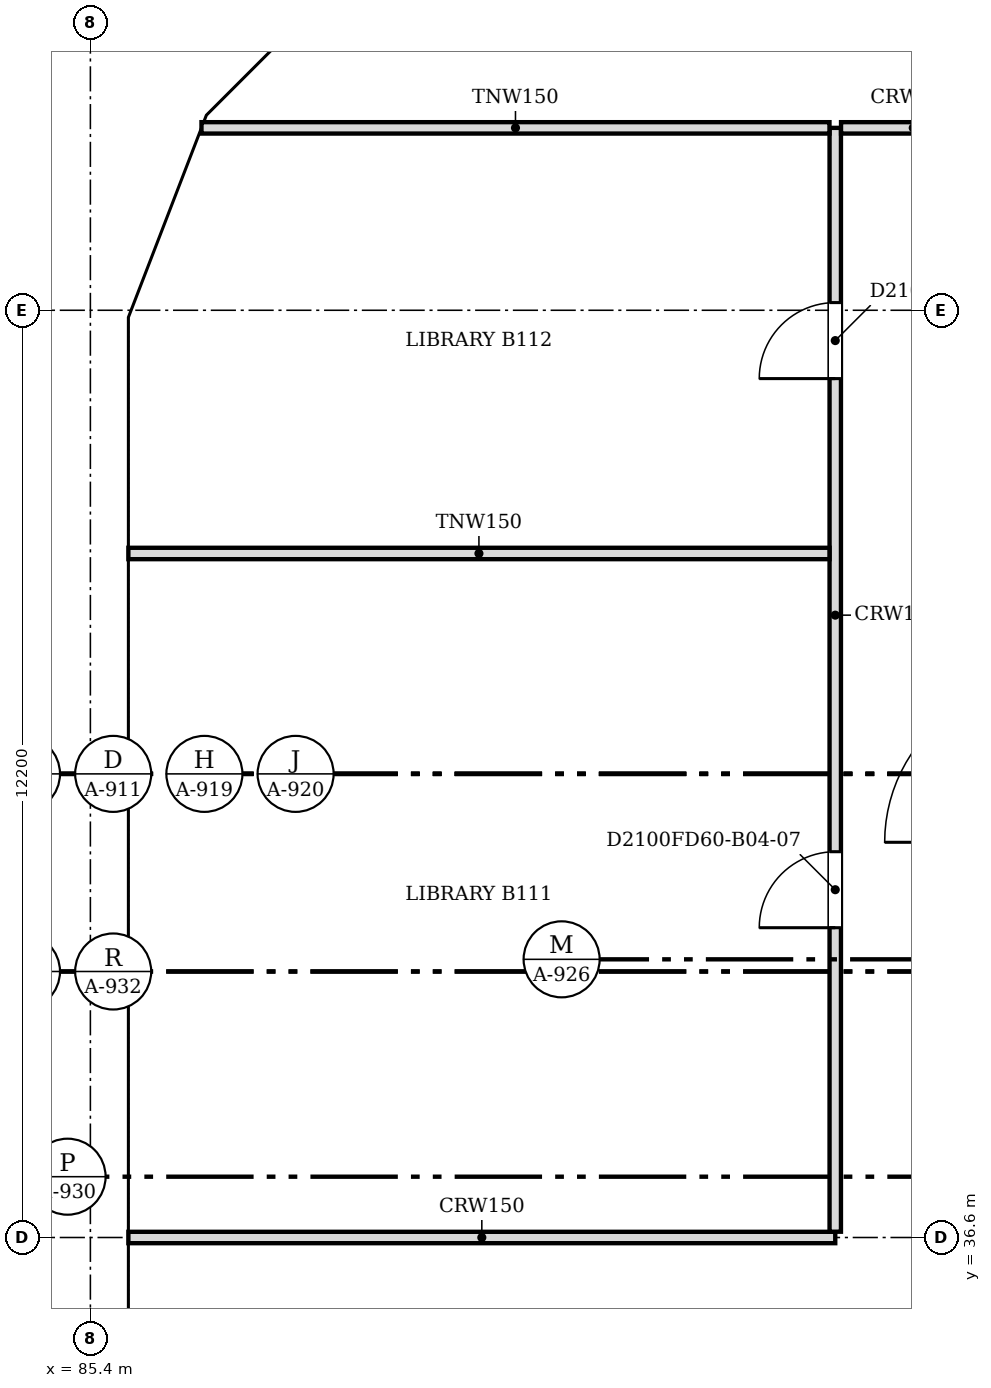
"""IFC4 building model, lengths in metres.
Left out: names, types, materials, properties, quantities, classifications, styles, units other than length and angle.
Written with IfcOpenShell. Run it as: python <this file> out.ifc"""

import sys

from ifc_helpers import new_model, si_unit, direction, frame, frame_2d, origin, place, context, subcontext, project, spatial, polyline, rectangle, outline, extrude, faceted_brep, source, transform, mapped, element, fill, save


model = new_model("IFC4")
c1 = context("Model", 3, precision=1e-05, world=origin(), true_north=direction((0.0, 1.0)))
c2 = subcontext(c1, "Body", "Model", "MODEL_VIEW")
j1 = project(units=[si_unit("LENGTHUNIT", "METRE"), si_unit("PLANEANGLEUNIT", "RADIAN")], contexts=[c1])
p1 = place(None, origin())
s1 = spatial("IfcSite", under=j1, at=p1, CompositionType="ELEMENT")
p2 = place(p1, origin())
s2 = spatial("IfcBuilding", under=s1, at=p2, CompositionType="ELEMENT")
p3 = place(p2, frame((0.0, 0.0, 37.2)))
s3 = spatial("IfcBuildingStorey", under=s2, at=p3, CompositionType="ELEMENT", Elevation=37.2)
m1 = source(origin(), c2, "Body", "Brep", [
    faceted_brep([(0.053, -0.25, 0.0), (2.997, -0.25, 3.8), (0.053, -0.25, 7.6), (0.0, -0.25, 7.532), (0.0, -0.25, 0.068), (0.106, 0.25, 7.532), (2.944, 0.25, 3.868), (2.944, 0.25, 3.732), (0.106, 0.25, 0.068), (2.997, 0.0, 3.8), (0.053, 0.0, 0.0), (0.053, 0.0, 7.6)], [[[0, 1, 2, 3, 4]], [[5, 6, 7, 8]], [[8, 7, 9, 1, 0, 10]], [[6, 5, 11, 2, 1, 9]], [[3, 2, 11]], [[10, 0, 4]], [[8, 10, 4, 3, 11, 5]], [[9, 7, 6]]]),
])
p4 = place(p3, frame((88.831, 53.625, -3.8), z_axis=(0.0, 0.0, 1.0), x_axis=(-0.707147509625, -0.707066050402, 0.0)))
e1 = element("IfcWall", 1, at=p4, inside=s3, PredefinedType="SOLIDWALL", context=c2, shape_type="MappedRepresentation", body=[
    mapped(m1, transform((0.0, 0.0, 0.0), scale=1.0)),
])
m2 = source(origin(), c2, "Body", "SweptSolid", [
    extrude(outline(polyline([(0.253, 0.667), (2.681, 3.8), (0.253, 6.934), (0.253, 0.667)])), frame((0.0, 0.26, 0.0), z_axis=(0.0, -1.0, 0.0), x_axis=(1.0, 0.0, 0.0)), (0.0, 0.0, 1.0), 0.52),
])
p5 = place(p4, origin())
e2 = element("IfcOpeningElement", 2, at=p5, cuts=e1, PredefinedType="OPENING", context=c2, shape_type="MappedRepresentation", body=[
    mapped(m2, transform((0.0, 0.0, 0.0), scale=1.0)),
])
m3 = source(origin(), c2, "Body", "Brep", [
    faceted_brep([(2.95, -0.25, 0.0), (2.997, -0.25, 0.059), (2.997, -0.25, 7.541), (2.95, -0.25, 7.6), (0.0, -0.25, 3.8), (0.053, 0.25, 3.868), (2.904, 0.25, 7.54), (2.904, 0.25, 0.06), (0.053, 0.25, 3.732), (2.95, 0.0, 0.0), (2.95, 0.0, 7.6), (0.0, 0.0, 3.8)], [[[0, 1, 2, 3, 4]], [[5, 6, 7, 8]], [[1, 0, 9]], [[10, 3, 2]], [[6, 5, 11, 4, 3, 10]], [[8, 7, 9, 0, 4, 11]], [[8, 11, 5]], [[1, 9, 7, 6, 10, 2]]]),
])
p6 = place(p3, frame((86.712, 51.506, -3.8), z_axis=(0.0, 0.0, 1.0), x_axis=(-0.359874094142, -0.933000876937, 0.0)))
e3 = element("IfcWall", 3, at=p6, inside=s3, PredefinedType="SOLIDWALL", context=c2, shape_type="MappedRepresentation", body=[
    mapped(m3, transform((0.0, 0.0, 0.0), scale=1.0)),
])
m4 = source(origin(), c2, "Body", "SweptSolid", [
    extrude(outline(polyline([(2.75, 6.935), (0.316, 3.8), (2.75, 0.665), (2.75, 6.935)])), frame((0.0, 0.26, 0.0), z_axis=(0.0, -1.0, 0.0), x_axis=(1.0, 0.0, 0.0)), (0.0, 0.0, 1.0), 0.52),
])
p7 = place(p6, origin())
e4 = element("IfcOpeningElement", 4, at=p7, cuts=e3, PredefinedType="OPENING", context=c2, shape_type="MappedRepresentation", body=[
    mapped(m4, transform((0.0, 0.0, 0.0), scale=1.0)),
])
m5 = source(origin(), c2, "Body", "Brep", [
    faceted_brep([(0.047, -0.25, 0.0), (3.05, -0.25, 3.8), (0.047, -0.25, 7.6), (0.0, -0.25, 7.54), (0.0, -0.25, 0.06), (0.093, 0.25, 7.541), (3.05, 0.25, 3.8), (0.093, 0.25, 0.059), (0.047, 0.0, 0.0), (0.047, 0.0, 7.6)], [[[0, 1, 2, 3, 4]], [[5, 6, 7]], [[7, 6, 1, 0, 8]], [[6, 5, 9, 2, 1]], [[3, 2, 9]], [[8, 0, 4]], [[7, 8, 4, 3, 9, 5]]]),
])
p8 = place(p3, frame((85.65, 48.8, -3.8), z_axis=(0.0, 0.0, 1.0), x_axis=(0.0, -1.0, 0.0)))
e5 = element("IfcWall", 5, at=p8, inside=s3, PredefinedType="SOLIDWALL", context=c2, shape_type="MappedRepresentation", body=[
    mapped(m5, transform((0.0, 0.0, 0.0), scale=1.0)),
])
m6 = source(origin(), c2, "Body", "SweptSolid", [
    extrude(outline(polyline([(0.247, 0.656), (2.731, 3.8), (0.247, 6.944), (0.247, 0.656)])), frame((0.0, 0.26, 0.0), z_axis=(0.0, -1.0, 0.0), x_axis=(1.0, 0.0, 0.0)), (0.0, 0.0, 1.0), 0.52),
])
p9 = place(p8, origin())
e6 = element("IfcOpeningElement", 6, at=p9, cuts=e5, PredefinedType="OPENING", context=c2, shape_type="MappedRepresentation", body=[
    mapped(m6, transform((0.0, 0.0, 0.0), scale=1.0)),
])
m7 = source(origin(), c2, "Body", "SweptSolid", [
    extrude(outline(polyline([(3.05, 0.0), (6.1, 3.8), (3.05, 7.6), (0.0, 3.8), (3.05, 0.0)])), frame((0.0, 0.25, 0.0), z_axis=(0.0, -1.0, 0.0), x_axis=(1.0, 0.0, 0.0)), (0.0, 0.0, 1.0), 0.5),
])
p10 = place(p3, frame((85.65, 45.75, -3.8), z_axis=(0.0, 0.0, 1.0), x_axis=(0.0, -1.0, 0.0)))
e7 = element("IfcWall", 7, at=p10, inside=s3, PredefinedType="SOLIDWALL", context=c2, shape_type="MappedRepresentation", body=[
    mapped(m7, transform((0.0, 0.0, 0.0), scale=1.0)),
])
m8 = source(origin(), c2, "Body", "SweptSolid", [
    extrude(outline(polyline([(3.05, 0.399), (5.78, 3.8), (3.05, 7.201), (0.321, 3.8), (3.05, 0.399)])), frame((0.0, 0.26, 0.0), z_axis=(0.0, -1.0, 0.0), x_axis=(1.0, 0.0, 0.0)), (0.0, 0.0, 1.0), 0.52),
])
p11 = place(p10, origin())
e8 = element("IfcOpeningElement", 8, at=p11, cuts=e7, PredefinedType="OPENING", context=c2, shape_type="MappedRepresentation", body=[
    mapped(m8, transform((0.0, 0.0, 0.0), scale=1.0)),
])
m9 = source(origin(), c2, "Body", "Brep", [
    faceted_brep([(3.05, -0.25, 0.0), (6.1, -0.25, 3.8), (6.1, -0.25, 3.8), (3.05, -0.25, 7.6), (0.0, -0.25, 3.8), (0.0, 0.25, 3.8), (3.05, 0.25, 7.6), (6.1, 0.25, 3.8), (6.1, 0.25, 3.8), (3.05, 0.25, 0.0)], [[[0, 1, 2, 3, 4]], [[5, 6, 7, 8, 9]], [[9, 8, 1, 0]], [[7, 6, 3, 2]], [[6, 5, 4, 3]], [[5, 9, 0, 4]], [[1, 8, 7, 2]]]),
])
p12 = place(p3, frame((85.65, 39.65, -3.8), z_axis=(0.0, 0.0, 1.0), x_axis=(0.0, -1.0, 0.0)))
e9 = element("IfcWall", 9, at=p12, inside=s3, PredefinedType="SOLIDWALL", context=c2, shape_type="MappedRepresentation", body=[
    mapped(m9, transform((0.0, 0.0, 0.0), scale=1.0)),
])
p13 = place(p12, origin())
e10 = element("IfcOpeningElement", 10, at=p13, cuts=e9, PredefinedType="OPENING", context=c2, shape_type="MappedRepresentation", body=[
    mapped(m8, transform((0.0, 0.0, 0.0), scale=1.0)),
])
p14 = place(p2, frame((0.0, 0.0, 41.0)))
s4 = spatial("IfcBuildingStorey", under=s2, at=p14, CompositionType="ELEMENT", Elevation=41.0)
m10 = source(origin(), c2, "Body", "Brep", [
    faceted_brep([(2.944, -0.25, 0.0), (2.997, -0.25, 0.068), (2.997, -0.25, 7.532), (2.944, -0.25, 7.6), (0.0, -0.25, 3.8), (0.053, 0.25, 3.868), (2.891, 0.25, 7.532), (2.891, 0.25, 0.068), (0.053, 0.25, 3.732), (2.944, 0.0, 0.0), (2.944, 0.0, 7.6), (0.0, 0.0, 3.8)], [[[0, 1, 2, 3, 4]], [[5, 6, 7, 8]], [[1, 0, 9]], [[10, 3, 2]], [[6, 5, 11, 4, 3, 10]], [[8, 7, 9, 0, 4, 11]], [[8, 11, 5]], [[1, 9, 7, 6, 10, 2]]]),
])
p15 = place(p14, frame((88.794, 53.588, -3.8), z_axis=(0.0, 0.0, 1.0), x_axis=(-0.707066050402, -0.707147509625, 0.0)))
e11 = element("IfcWall", 11, at=p15, inside=s4, PredefinedType="SOLIDWALL", context=c2, shape_type="MappedRepresentation", body=[
    mapped(m10, transform((0.0, 0.0, 0.0), scale=1.0)),
])
m11 = source(origin(), c2, "Body", "SweptSolid", [
    extrude(outline(polyline([(2.744, 6.934), (0.316, 3.8), (2.744, 0.666), (2.744, 6.934)])), frame((0.0, 0.26, 0.0), z_axis=(0.0, -1.0, 0.0), x_axis=(1.0, 0.0, 0.0)), (0.0, 0.0, 1.0), 0.52),
])
p16 = place(p15, origin())
e12 = element("IfcOpeningElement", 12, at=p16, cuts=e11, PredefinedType="OPENING", context=c2, shape_type="MappedRepresentation", body=[
    mapped(m11, transform((0.0, 0.0, 0.0), scale=1.0)),
])
m12 = source(origin(), c2, "Body", "Brep", [
    faceted_brep([(0.053, -0.25, 0.0), (3.003, -0.25, 3.8), (0.053, -0.25, 7.6), (0.0, -0.25, 7.532), (0.0, -0.25, 0.068), (0.106, 0.25, 7.532), (2.957, 0.25, 3.86), (2.957, 0.25, 3.74), (0.106, 0.25, 0.068), (3.003, 0.0, 3.8), (0.053, 0.0, 0.0), (0.053, 0.0, 7.6)], [[[0, 1, 2, 3, 4]], [[5, 6, 7, 8]], [[8, 7, 9, 1, 0, 10]], [[6, 5, 11, 2, 1, 9]], [[3, 2, 11]], [[10, 0, 4]], [[8, 10, 4, 3, 11, 5]], [[9, 7, 6]]]),
])
p17 = place(p14, frame((86.731, 51.556, -3.8), z_axis=(0.0, 0.0, 1.0), x_axis=(-0.359855894603, -0.933007896601, 0.0)))
e13 = element("IfcWall", 13, at=p17, inside=s4, PredefinedType="SOLIDWALL", context=c2, shape_type="MappedRepresentation", body=[
    mapped(m12, transform((0.0, 0.0, 0.0), scale=1.0)),
])
m13 = source(origin(), c2, "Body", "SweptSolid", [
    extrude(outline(polyline([(0.253, 0.665), (2.687, 3.8), (0.253, 6.935), (0.253, 0.665)])), frame((0.0, 0.26, 0.0), z_axis=(0.0, -1.0, 0.0), x_axis=(1.0, 0.0, 0.0)), (0.0, 0.0, 1.0), 0.52),
])
p18 = place(p17, origin())
e14 = element("IfcOpeningElement", 14, at=p18, cuts=e13, PredefinedType="OPENING", context=c2, shape_type="MappedRepresentation", body=[
    mapped(m13, transform((0.0, 0.0, 0.0), scale=1.0)),
])
m14 = source(origin(), c2, "Body", "Brep", [
    faceted_brep([(3.003, -0.25, 0.0), (6.053, -0.25, 3.8), (3.003, -0.25, 7.6), (0.0, -0.25, 3.8), (0.047, 0.25, 3.859), (3.003, 0.25, 7.6), (6.053, 0.25, 3.8), (3.003, 0.25, 0.0), (0.047, 0.25, 3.741), (0.0, 0.0, 3.8)], [[[0, 1, 2, 3]], [[4, 5, 6, 7, 8]], [[7, 6, 1, 0]], [[6, 5, 2, 1]], [[5, 4, 9, 3, 2]], [[8, 7, 0, 3, 9]], [[8, 9, 4]]]),
])
p19 = place(p14, frame((85.65, 48.753, -3.8), z_axis=(0.0, 0.0, 1.0), x_axis=(0.0, -1.0, 0.0)))
e15 = element("IfcWall", 15, at=p19, inside=s4, PredefinedType="SOLIDWALL", context=c2, shape_type="MappedRepresentation", body=[
    mapped(m14, transform((0.0, 0.0, 0.0), scale=1.0)),
])
m15 = source(origin(), c2, "Body", "SweptSolid", [
    extrude(outline(polyline([(3.005, 0.401), (5.733, 3.8), (3.005, 7.199), (0.319, 3.8), (3.005, 0.401)])), frame((0.0, 0.26, 0.0), z_axis=(0.0, -1.0, 0.0), x_axis=(1.0, 0.0, 0.0)), (0.0, 0.0, 1.0), 0.52),
])
p20 = place(p19, origin())
e16 = element("IfcOpeningElement", 16, at=p20, cuts=e15, PredefinedType="OPENING", context=c2, shape_type="MappedRepresentation", body=[
    mapped(m15, transform((0.0, 0.0, 0.0), scale=1.0)),
])
p21 = place(p14, frame((85.65, 42.7, -3.8), z_axis=(0.0, 0.0, 1.0), x_axis=(0.0, -1.0, 0.0)))
e17 = element("IfcWall", 17, at=p21, inside=s4, PredefinedType="SOLIDWALL", context=c2, shape_type="MappedRepresentation", body=[
    mapped(m9, transform((0.0, 0.0, 0.0), scale=1.0)),
])
p22 = place(p21, origin())
e18 = element("IfcOpeningElement", 18, at=p22, cuts=e17, PredefinedType="OPENING", context=c2, shape_type="MappedRepresentation", body=[
    mapped(m8, transform((0.0, 0.0, 0.0), scale=1.0)),
])
p23 = place(p14, frame((85.65, 36.6, -3.8), z_axis=(0.0, 0.0, 1.0), x_axis=(0.0, -1.0, 0.0)))
e19 = element("IfcWall", 19, at=p23, inside=s4, PredefinedType="SOLIDWALL", context=c2, shape_type="MappedRepresentation", body=[
    mapped(m7, transform((0.0, 0.0, 0.0), scale=1.0)),
])
p24 = place(p23, origin())
e20 = element("IfcOpeningElement", 20, at=p24, cuts=e19, PredefinedType="OPENING", context=c2, shape_type="MappedRepresentation", body=[
    mapped(m8, transform((0.0, 0.0, 0.0), scale=1.0)),
])
p25 = place(p3, frame((85.9, 36.6, 0.0), z_axis=(0.0, 0.0, 1.0), x_axis=(1.0, 0.0, 0.0)))
e21 = element("IfcWall", 21, at=p25, inside=s3, PredefinedType="PARTITIONING", context=c2, shape_type="SweptSolid", body=[
    extrude(rectangle(XDim=9.3, YDim=0.15, at=frame_2d((4.65, 0.0))), origin(), (0.0, 0.0, 1.0), 3.067),
])
p26 = place(p3, frame((95.2, 36.676, 0.0), z_axis=(0.0, 0.0, 1.0), x_axis=(0.0, 1.0, 0.0)))
e22 = element("IfcWall", 22, at=p26, inside=s3, PredefinedType="PARTITIONING", context=c2, shape_type="SweptSolid", body=[
    extrude(rectangle(XDim=14.524, YDim=0.15, at=frame_2d((7.262, 0.0))), origin(), (0.0, 0.0, 1.0), 3.067),
])
m16 = source(origin(), c2, "Body", "SweptSolid", [
    extrude(rectangle(XDim=1.0, YDim=2.1, at=frame_2d((0.5, 1.05))), frame((0.0, 0.085, 0.0), z_axis=(0.0, -1.0, 0.0), x_axis=(1.0, 0.0, 0.0)), (0.0, 0.0, 1.0), 0.17),
])
p27 = place(p26, frame((11.225, 0.0, 0.0)))
e23 = element("IfcOpeningElement", 23, at=p27, cuts=e22, PredefinedType="OPENING", context=c2, shape_type="MappedRepresentation", body=[
    mapped(m16, transform((0.0, 0.0, 0.0), scale=1.0)),
])
p28 = place(p26, frame((4.0, 0.0, 0.0)))
e24 = element("IfcOpeningElement", 24, at=p28, cuts=e22, PredefinedType="OPENING", context=c2, shape_type="MappedRepresentation", body=[
    mapped(m16, transform((0.0, 0.0, 0.0), scale=1.0)),
])
p29 = place(p3, frame((85.9, 45.6, 0.0), z_axis=(0.0, 0.0, 1.0), x_axis=(1.0, 0.0, 0.0)))
e25 = element("IfcWall", 25, at=p29, inside=s3, PredefinedType="PARTITIONING", context=c2, shape_type="SweptSolid", body=[
    extrude(rectangle(XDim=9.224, YDim=0.15, at=frame_2d((4.612, 0.0))), origin(), (0.0, 0.0, 1.0), 3.067),
])
p30 = place(p3, frame((86.862, 51.2, 0.0), z_axis=(0.0, 0.0, 1.0), x_axis=(1.0, 0.0, 0.0)))
e26 = element("IfcWall", 26, at=p30, inside=s3, PredefinedType="PARTITIONING", context=c2, shape_type="SweptSolid", body=[
    extrude(rectangle(XDim=8.262, YDim=0.15, at=frame_2d((4.131, 0.0))), origin(), (0.0, 0.0, 1.0), 3.067),
])
p31 = place(p3, frame((95.276, 51.2, 0.0), z_axis=(0.0, 0.0, 1.0), x_axis=(1.0, 0.0, 0.0)))
e27 = element("IfcWall", 27, at=p31, inside=s3, PredefinedType="PARTITIONING", context=c2, shape_type="SweptSolid", body=[
    extrude(rectangle(XDim=4.724, YDim=0.15, at=frame_2d((2.362, 0.0))), origin(), (0.0, 0.0, 1.0), 3.067),
])
p32 = place(p31, frame((1.9, 0.0, 0.0)))
e28 = element("IfcOpeningElement", 28, at=p32, cuts=e27, PredefinedType="OPENING", context=c2, shape_type="MappedRepresentation", body=[
    mapped(m16, transform((0.0, 0.0, 0.0), scale=1.0)),
])
m17 = source(origin(), c2, "Body", "SweptSolid", [
    extrude(rectangle(XDim=1.0, YDim=2.1, at=frame_2d((0.5, 1.05))), frame((0.0, 0.025, 0.0), z_axis=(0.0, -1.0, 0.0), x_axis=(1.0, 0.0, 0.0)), (0.0, 0.0, 1.0), 0.05),
])
p33 = place(p27, origin())
e29 = element("IfcDoor", 29, at=p33, inside=s3, OperationType="SINGLE_SWING_LEFT", PredefinedType="DOOR", context=c2, shape_type="MappedRepresentation", body=[
    mapped(m17, transform((0.0, 0.0, 0.0), scale=1.0)),
])
fill(e23, e29)
p34 = place(p28, origin())
e30 = element("IfcDoor", 30, at=p34, inside=s3, OperationType="SINGLE_SWING_LEFT", PredefinedType="DOOR", context=c2, shape_type="MappedRepresentation", body=[
    mapped(m17, transform((0.0, 0.0, 0.0), scale=1.0)),
])
fill(e24, e30)
save(model, sys.argv[1])
